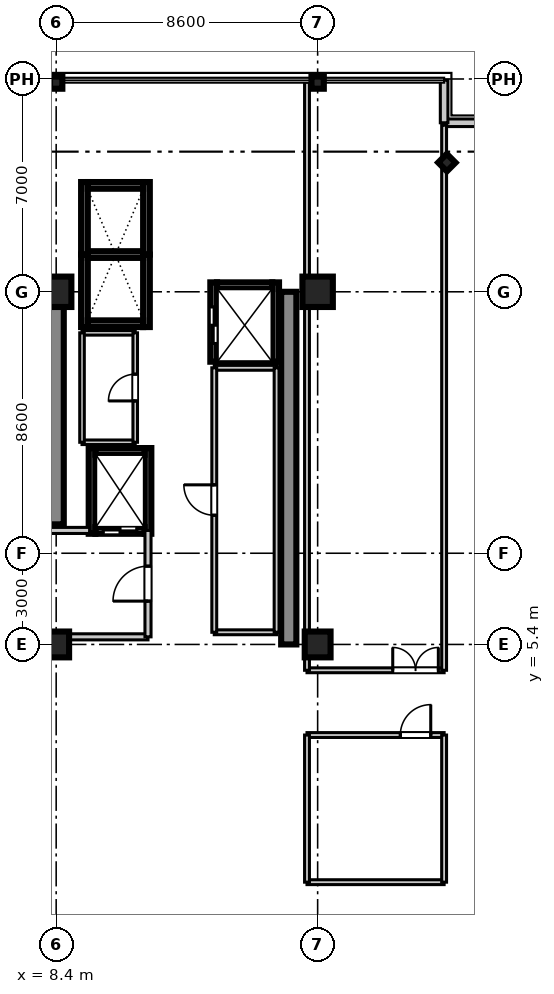
"""IFC4 building model, lengths in metres.
Left out: names, types, materials, properties, quantities, classifications, styles, units other than length and angle.
Written with IfcOpenShell. Run it as: python <this file> out.ifc"""

import sys

from ifc_helpers import new_model, si_unit, direction, frame, frame_2d, origin, origin_2d, place, context, subcontext, project, spatial, rectangle, i_section, extrude, source, transform, mapped, element, fill, save


model = new_model("IFC4")
c1 = context("Model", 3, precision=1e-05, world=origin(), true_north=direction((0.0, 1.0)))
c2 = subcontext(c1, "Body", "Model", "MODEL_VIEW")
j1 = project(units=[si_unit("LENGTHUNIT", "METRE"), si_unit("PLANEANGLEUNIT", "RADIAN")], contexts=[c1])
p1 = place(None, origin())
s1 = spatial("IfcSite", under=j1, at=p1, CompositionType="ELEMENT")
p2 = place(p1, origin())
s2 = spatial("IfcBuilding", under=s1, at=p2, CompositionType="ELEMENT")
p3 = place(p2, frame((0.0, 0.0, 249.3)))
s3 = spatial("IfcBuildingStorey", under=s2, at=p3, CompositionType="ELEMENT", Elevation=249.3)
m1 = source(origin(), c2, "Body", "SweptSolid", [
    extrude(rectangle(XDim=0.85, YDim=0.85, at=origin_2d()), origin(), (0.0, 0.0, 1.0), 3.655),
])
p4 = place(p3, frame((8.4, 5.4, 0.0), z_axis=(0.0, 0.0, 1.0), x_axis=(1.0, 0.0, 0.0)))
e1 = element("IfcColumn", 1, at=p4, inside=s3, PredefinedType="PILASTER", context=c2, shape_type="MappedRepresentation", body=[
    mapped(m1, transform((0.0, 0.0, 0.0), scale=1.0)),
])
m2 = source(origin(), c2, "Body", "SweptSolid", [
    extrude(rectangle(XDim=1.0, YDim=1.0, at=origin_2d()), origin(), (0.0, 0.0, 1.0), 3.655),
])
p5 = place(p3, frame((8.4, 17.0, 0.0), z_axis=(0.0, 0.0, 1.0), x_axis=(1.0, 0.0, 0.0)))
e2 = element("IfcColumn", 2, at=p5, inside=s3, PredefinedType="COLUMN", context=c2, shape_type="MappedRepresentation", body=[
    mapped(m2, transform((0.0, 0.0, 0.0), scale=1.0)),
])
p6 = place(p3, frame((17.0, 5.4, 0.0), z_axis=(0.0, 0.0, 1.0), x_axis=(1.0, 0.0, 0.0)))
e3 = element("IfcColumn", 3, at=p6, inside=s3, PredefinedType="PILASTER", context=c2, shape_type="MappedRepresentation", body=[
    mapped(m1, transform((0.0, 0.0, 0.0), scale=1.0)),
])
p7 = place(p3, frame((17.0, 17.0, 0.0), z_axis=(0.0, 0.0, 1.0), x_axis=(1.0, 0.0, 0.0)))
e4 = element("IfcColumn", 4, at=p7, inside=s3, PredefinedType="COLUMN", context=c2, shape_type="MappedRepresentation", body=[
    mapped(m2, transform((0.0, 0.0, 0.0), scale=1.0)),
])
m3 = source(origin(), c2, "Body", "SweptSolid", [
    extrude(i_section(OverallWidth=0.401, OverallDepth=0.406, WebThickness=0.016, FlangeThickness=0.025, at=origin_2d()), origin(), (0.0, 0.0, 1.0), 3.655),
])
for number, where, z_axis, x_axis in (
    (5, (8.4, 23.88, 0.0), (0.0, 0.0, 1.0), (0.0, 1.0, 0.0)),
    (6, (17.0, 23.88, 0.0), (0.0, 0.0, 1.0), (0.0, 1.0, 0.0)),
    (7, (21.25, 21.25, 0.0), (0.0, 0.0, 1.0), (0.707, 0.707, 0.0)),
):
    element("IfcColumn", number, at=place(p3, frame(where, z_axis=z_axis, x_axis=x_axis)), inside=s3, PredefinedType="COLUMN", context=c2, shape_type="MappedRepresentation", body=[
        mapped(m3, transform((0.0, 0.0, 0.0), scale=1.0)),
    ])
m4 = source(origin(), c2, "Body", "SweptSolid", [
    extrude(rectangle(XDim=7.65, YDim=0.5, at=frame_2d((3.825, 0.0))), origin(), (0.0, 0.0, 1.0), 3.41),
])
p8 = place(p3, frame((8.4, 9.35, 0.0), z_axis=(0.0, 0.0, 1.0), x_axis=(0.0, 1.0, 0.0)))
e8 = element("IfcWall", 8, at=p8, inside=s3, PredefinedType="SHEAR", context=c2, shape_type="MappedRepresentation", body=[
    mapped(m4, transform((0.0, 0.0, 0.0), scale=1.0)),
])
m5 = source(origin(), c2, "Body", "SweptSolid", [
    extrude(rectangle(XDim=11.6, YDim=0.5, at=frame_2d((5.8, 0.0))), origin(), (0.0, 0.0, 1.0), 3.41),
])
p9 = place(p3, frame((16.05, 5.4, 0.0), z_axis=(0.0, 0.0, 1.0), x_axis=(0.0, 1.0, 0.0)))
e9 = element("IfcWall", 9, at=p9, inside=s3, PredefinedType="SHEAR", context=c2, shape_type="MappedRepresentation", body=[
    mapped(m5, transform((0.0, 0.0, 0.0), scale=1.0)),
])
m6 = source(origin(), c2, "Body", "SweptSolid", [
    extrude(rectangle(XDim=2.385, YDim=0.22, at=frame_2d((1.192, 0.0))), origin(), (0.0, 0.0, 1.0), 3.41),
])
for number, where, z_axis, x_axis in (
    (10, (9.33, 15.84, 0.0), (0.0, 0.0, 1.0), (0.0, 1.0, 0.0)),
    (11, (11.37, 15.84, 0.0), (0.0, 0.0, 1.0), (0.0, 1.0, 0.0)),
):
    element("IfcWall", number, at=place(p3, frame(where, z_axis=z_axis, x_axis=x_axis)), inside=s3, PredefinedType="SHEAR", context=c2, shape_type="MappedRepresentation", body=[
        mapped(m6, transform((0.0, 0.0, 0.0), scale=1.0)),
    ])
m7 = source(origin(), c2, "Body", "SweptSolid", [
    extrude(rectangle(XDim=1.82, YDim=0.22, at=frame_2d((0.91, 0.0))), origin(), (0.0, 0.0, 1.0), 3.41),
])
p10 = place(p3, frame((9.44, 15.95, 0.0), z_axis=(0.0, 0.0, 1.0), x_axis=(1.0, 0.0, 0.0)))
e12 = element("IfcWall", 12, at=p10, inside=s3, PredefinedType="SHEAR", context=c2, shape_type="MappedRepresentation", body=[
    mapped(m7, transform((0.0, 0.0, 0.0), scale=1.0)),
])
m8 = source(origin(), c2, "Body", "SweptSolid", [
    extrude(rectangle(XDim=1.82, YDim=0.22, at=frame_2d((0.91, 0.0))), origin(), (0.0, 0.0, 1.0), 3.7),
])
p11 = place(p3, frame((9.44, 18.225, 0.0), z_axis=(0.0, 0.0, 1.0), x_axis=(1.0, 0.0, 0.0)))
e13 = element("IfcWall", 13, at=p11, inside=s3, PredefinedType="SHEAR", context=c2, shape_type="MappedRepresentation", body=[
    mapped(m8, transform((0.0, 0.0, 0.0), scale=1.0)),
])
for number, where, z_axis, x_axis in (
    (14, (9.33, 18.225, 0.0), (0.0, 0.0, 1.0), (0.0, 1.0, 0.0)),
    (15, (11.37, 18.225, 0.0), (0.0, 0.0, 1.0), (0.0, 1.0, 0.0)),
):
    element("IfcWall", number, at=place(p3, frame(where, z_axis=z_axis, x_axis=x_axis)), inside=s3, PredefinedType="SHEAR", context=c2, shape_type="MappedRepresentation", body=[
        mapped(m6, transform((0.0, 0.0, 0.0), scale=1.0)),
    ])
p12 = place(p3, frame((9.44, 20.5, 0.0), z_axis=(0.0, 0.0, 1.0), x_axis=(1.0, 0.0, 0.0)))
e16 = element("IfcWall", 16, at=p12, inside=s3, PredefinedType="SHEAR", context=c2, shape_type="MappedRepresentation", body=[
    mapped(m7, transform((0.0, 0.0, 0.0), scale=1.0)),
])
m9 = source(origin(), c2, "Body", "SweptSolid", [
    extrude(rectangle(XDim=2.82, YDim=0.22, at=frame_2d((1.41, 0.0))), origin(), (0.0, 0.0, 1.0), 3.41),
])
for number, where, z_axis, x_axis in (
    (17, (9.58, 9.04, 0.0), (0.0, 0.0, 1.0), (0.0, 1.0, 0.0)),
    (18, (11.42, 9.04, 0.0), (0.0, 0.0, 1.0), (0.0, 1.0, 0.0)),
):
    element("IfcWall", number, at=place(p3, frame(where, z_axis=z_axis, x_axis=x_axis)), inside=s3, PredefinedType="SHEAR", context=c2, shape_type="MappedRepresentation", body=[
        mapped(m9, transform((0.0, 0.0, 0.0), scale=1.0)),
    ])
m10 = source(origin(), c2, "Body", "SweptSolid", [
    extrude(rectangle(XDim=1.62, YDim=0.22, at=frame_2d((0.81, 0.0))), origin(), (0.0, 0.0, 1.0), 3.41),
])
p13 = place(p3, frame((9.69, 9.15, 0.0), z_axis=(0.0, 0.0, 1.0), x_axis=(1.0, 0.0, 0.0)))
e19 = element("IfcWall", 19, at=p13, inside=s3, PredefinedType="SHEAR", context=c2, shape_type="MappedRepresentation", body=[
    mapped(m10, transform((0.0, 0.0, 0.0), scale=1.0)),
])
p14 = place(p13, frame((0.26, 0.0, 0.0)))
e20 = element("IfcOpeningElement", 20, at=p14, cuts=e19, PredefinedType="OPENING", context=c2, shape_type="SweptSolid", body=[
    extrude(rectangle(XDim=1.1, YDim=2.2, at=frame_2d((0.55, 1.1))), frame((0.0, 0.12, 0.0), z_axis=(0.0, -1.0, 0.0), x_axis=(1.0, 0.0, 0.0)), (0.0, 0.0, 1.0), 0.24),
])
p15 = place(p3, frame((9.69, 11.75, 0.0), z_axis=(0.0, 0.0, 1.0), x_axis=(1.0, 0.0, 0.0)))
e21 = element("IfcWall", 21, at=p15, inside=s3, PredefinedType="SHEAR", context=c2, shape_type="MappedRepresentation", body=[
    mapped(m10, transform((0.0, 0.0, 0.0), scale=1.0)),
])
m11 = source(origin(), c2, "Body", "SweptSolid", [
    extrude(rectangle(XDim=2.61, YDim=0.22, at=frame_2d((1.305, 0.0))), origin(), (0.0, 0.0, 1.0), 3.41),
])
p16 = place(p3, frame((13.58, 14.7, 0.0), z_axis=(0.0, 0.0, 1.0), x_axis=(0.0, 1.0, 0.0)))
e22 = element("IfcWall", 22, at=p16, inside=s3, PredefinedType="SHEAR", context=c2, shape_type="MappedRepresentation", body=[
    mapped(m11, transform((0.0, 0.0, 0.0), scale=1.0)),
])
p17 = place(p16, frame((0.6, 0.0, 0.0)))
e23 = element("IfcOpeningElement", 23, at=p17, cuts=e22, PredefinedType="OPENING", context=c2, shape_type="SweptSolid", body=[
    extrude(rectangle(XDim=1.2, YDim=2.2, at=frame_2d((0.6, 1.1))), frame((0.0, 0.12, 0.0), z_axis=(0.0, -1.0, 0.0), x_axis=(1.0, 0.0, 0.0)), (0.0, 0.0, 1.0), 0.24),
])
p18 = place(p3, frame((15.62, 14.7, 0.0), z_axis=(0.0, 0.0, 1.0), x_axis=(0.0, 1.0, 0.0)))
e24 = element("IfcWall", 24, at=p18, inside=s3, PredefinedType="SHEAR", context=c2, shape_type="MappedRepresentation", body=[
    mapped(m11, transform((0.0, 0.0, 0.0), scale=1.0)),
])
p19 = place(p3, frame((13.69, 17.2, 0.0), z_axis=(0.0, 0.0, 1.0), x_axis=(1.0, 0.0, 0.0)))
e25 = element("IfcWall", 25, at=p19, inside=s3, PredefinedType="SHEAR", context=c2, shape_type="MappedRepresentation", body=[
    mapped(m7, transform((0.0, 0.0, 0.0), scale=1.0)),
])
m12 = source(origin(), c2, "Body", "SweptSolid", [
    extrude(rectangle(XDim=1.4, YDim=0.25, at=frame_2d((0.7, 0.0))), origin(), (0.0, 0.0, 1.0), 3.41),
])
p20 = place(p3, frame((21.16, 22.56, 0.0), z_axis=(0.0, 0.0, 1.0), x_axis=(1.0, 0.0, 0.0)))
e26 = element("IfcWall", 26, at=p20, inside=s3, PredefinedType="STANDARD", context=c2, shape_type="MappedRepresentation", body=[
    mapped(m12, transform((0.0, 0.0, 0.0), scale=1.0)),
])
m13 = source(origin(), c2, "Body", "SweptSolid", [
    extrude(rectangle(XDim=1.4, YDim=0.25, at=frame_2d((0.7, 0.0))), origin(), (0.0, 0.0, 1.0), 3.41),
])
p21 = place(p3, frame((21.16, 22.56, 0.0), z_axis=(0.0, 0.0, 1.0), x_axis=(0.0, 1.0, 0.0)))
e27 = element("IfcWall", 27, at=p21, inside=s3, PredefinedType="STANDARD", context=c2, shape_type="MappedRepresentation", body=[
    mapped(m13, transform((0.0, 0.0, 0.0), scale=1.0)),
])
m14 = source(origin(), c2, "Body", "SweptSolid", [
    extrude(rectangle(XDim=3.82, YDim=0.2, at=frame_2d((1.91, 0.0))), origin(), (0.0, 0.0, 1.0), 2.75),
])
p22 = place(p3, frame((7.6, 5.65, 0.0), z_axis=(0.0, 0.0, 1.0), x_axis=(1.0, 0.0, 0.0)))
e28 = element("IfcWall", 28, at=p22, inside=s3, PredefinedType="PARTITIONING", context=c2, shape_type="MappedRepresentation", body=[
    mapped(m14, transform((0.0, 0.0, 0.0), scale=1.0)),
])
m15 = source(origin(), c2, "Body", "SweptSolid", [
    extrude(rectangle(XDim=1.9, YDim=0.2, at=frame_2d((0.95, 0.0))), origin(), (0.0, 0.0, 1.0), 2.75),
])
p23 = place(p3, frame((7.6, 9.15, 0.0), z_axis=(0.0, 0.0, 1.0), x_axis=(1.0, 0.0, 0.0)))
e29 = element("IfcWall", 29, at=p23, inside=s3, PredefinedType="PARTITIONING", context=c2, shape_type="MappedRepresentation", body=[
    mapped(m15, transform((0.0, 0.0, 0.0), scale=1.0)),
])
m16 = source(origin(), c2, "Body", "SweptSolid", [
    extrude(rectangle(XDim=3.5, YDim=0.2, at=frame_2d((1.75, 0.0))), origin(), (0.0, 0.0, 1.0), 2.75),
])
p24 = place(p3, frame((11.42, 5.65, 0.0), z_axis=(0.0, 0.0, 1.0), x_axis=(0.0, 1.0, 0.0)))
e30 = element("IfcWall", 30, at=p24, inside=s3, PredefinedType="PARTITIONING", context=c2, shape_type="MappedRepresentation", body=[
    mapped(m16, transform((0.0, 0.0, 0.0), scale=1.0)),
])
p25 = place(p24, frame((1.175, 0.0, 0.0)))
e31 = element("IfcOpeningElement", 31, at=p25, cuts=e30, PredefinedType="OPENING", context=c2, shape_type="SweptSolid", body=[
    extrude(rectangle(XDim=1.15, YDim=2.15, at=frame_2d((0.575, 1.075))), frame((0.0, 0.11, 0.0), z_axis=(0.0, -1.0, 0.0), x_axis=(1.0, 0.0, 0.0)), (0.0, 0.0, 1.0), 0.22),
])
m17 = source(origin(), c2, "Body", "SweptSolid", [
    extrude(rectangle(XDim=1.75, YDim=0.15, at=frame_2d((0.875, 0.0))), origin(), (0.0, 0.0, 1.0), 2.75),
])
for number, where, z_axis, x_axis in (
    (32, (9.25, 12.05, 0.0), (0.0, 0.0, 1.0), (1.0, 0.0, 0.0)),
    (33, (9.25, 15.65, 0.0), (0.0, 0.0, 1.0), (1.0, 0.0, 0.0)),
):
    element("IfcWall", number, at=place(p3, frame(where, z_axis=z_axis, x_axis=x_axis)), inside=s3, PredefinedType="PARTITIONING", context=c2, shape_type="MappedRepresentation", body=[
        mapped(m17, transform((0.0, 0.0, 0.0), scale=1.0)),
    ])
m18 = source(origin(), c2, "Body", "SweptSolid", [
    extrude(rectangle(XDim=3.6, YDim=0.15, at=frame_2d((1.8, 0.0))), origin(), (0.0, 0.0, 1.0), 2.75),
])
p26 = place(p3, frame((9.25, 12.05, 0.0), z_axis=(0.0, 0.0, 1.0), x_axis=(0.0, 1.0, 0.0)))
e34 = element("IfcWall", 34, at=p26, inside=s3, PredefinedType="PARTITIONING", context=c2, shape_type="MappedRepresentation", body=[
    mapped(m18, transform((0.0, 0.0, 0.0), scale=1.0)),
])
p27 = place(p3, frame((11.0, 12.05, 0.0), z_axis=(0.0, 0.0, 1.0), x_axis=(0.0, 1.0, 0.0)))
e35 = element("IfcWall", 35, at=p27, inside=s3, PredefinedType="PARTITIONING", context=c2, shape_type="MappedRepresentation", body=[
    mapped(m18, transform((0.0, 0.0, 0.0), scale=1.0)),
])
p28 = place(p27, frame((1.36, 0.0, 0.0)))
e36 = element("IfcOpeningElement", 36, at=p28, cuts=e35, PredefinedType="OPENING", context=c2, shape_type="SweptSolid", body=[
    extrude(rectangle(XDim=0.88, YDim=2.1, at=frame_2d((0.44, 1.05))), frame((0.0, 0.085, 0.0), z_axis=(0.0, -1.0, 0.0), x_axis=(1.0, 0.0, 0.0)), (0.0, 0.0, 1.0), 0.17),
])
m19 = source(origin(), c2, "Body", "SweptSolid", [
    extrude(rectangle(XDim=2.05, YDim=0.16, at=frame_2d((1.025, 0.0))), origin(), (0.0, 0.0, 1.0), 2.75),
])
for number, where, z_axis, x_axis in (
    (37, (13.6, 5.8, 0.0), (0.0, 0.0, 1.0), (1.0, 0.0, 0.0)),
    (38, (13.6, 14.5, 0.0), (0.0, 0.0, 1.0), (1.0, 0.0, 0.0)),
):
    element("IfcWall", number, at=place(p3, frame(where, z_axis=z_axis, x_axis=x_axis)), inside=s3, PredefinedType="PARTITIONING", context=c2, shape_type="MappedRepresentation", body=[
        mapped(m19, transform((0.0, 0.0, 0.0), scale=1.0)),
    ])
m20 = source(origin(), c2, "Body", "SweptSolid", [
    extrude(rectangle(XDim=8.7, YDim=0.16, at=frame_2d((4.35, 0.0))), origin(), (0.0, 0.0, 1.0), 2.75),
])
p29 = place(p3, frame((13.6, 5.8, 0.0), z_axis=(0.0, 0.0, 1.0), x_axis=(0.0, 1.0, 0.0)))
e39 = element("IfcWall", 39, at=p29, inside=s3, PredefinedType="PARTITIONING", context=c2, shape_type="MappedRepresentation", body=[
    mapped(m20, transform((0.0, 0.0, 0.0), scale=1.0)),
])
p30 = place(p29, frame((3.85, 0.0, 0.0)))
e40 = element("IfcOpeningElement", 40, at=p30, cuts=e39, PredefinedType="OPENING", context=c2, shape_type="SweptSolid", body=[
    extrude(rectangle(XDim=1.0, YDim=2.1, at=frame_2d((0.5, 1.05))), frame((0.0, 0.09, 0.0), z_axis=(0.0, -1.0, 0.0), x_axis=(1.0, 0.0, 0.0)), (0.0, 0.0, 1.0), 0.18),
])
p31 = place(p3, frame((15.65, 5.8, 0.0), z_axis=(0.0, 0.0, 1.0), x_axis=(0.0, 1.0, 0.0)))
e41 = element("IfcWall", 41, at=p31, inside=s3, PredefinedType="PARTITIONING", context=c2, shape_type="MappedRepresentation", body=[
    mapped(m20, transform((0.0, 0.0, 0.0), scale=1.0)),
])
m21 = source(origin(), c2, "Body", "SweptSolid", [
    extrude(rectangle(XDim=4.51, YDim=0.16, at=frame_2d((2.255, 0.0))), origin(), (0.0, 0.0, 1.0), 2.75),
])
p32 = place(p3, frame((16.65, 4.55, 0.0), z_axis=(0.0, 0.0, 1.0), x_axis=(1.0, 0.0, 0.0)))
e42 = element("IfcWall", 42, at=p32, inside=s3, PredefinedType="PARTITIONING", context=c2, shape_type="MappedRepresentation", body=[
    mapped(m21, transform((0.0, 0.0, 0.0), scale=1.0)),
])
p33 = place(p32, frame((2.82, 0.0, 0.0)))
e43 = element("IfcOpeningElement", 43, at=p33, cuts=e42, PredefinedType="OPENING", context=c2, shape_type="SweptSolid", body=[
    extrude(rectangle(XDim=1.5, YDim=2.15, at=frame_2d((0.75, 1.075))), frame((0.0, 0.09, 0.0), z_axis=(0.0, -1.0, 0.0), x_axis=(1.0, 0.0, 0.0)), (0.0, 0.0, 1.0), 0.18),
])
m22 = source(origin(), c2, "Body", "SweptSolid", [
    extrude(rectangle(XDim=19.35, YDim=0.16, at=frame_2d((9.675, 0.0))), origin(), (0.0, 0.0, 1.0), 2.75),
])
p34 = place(p3, frame((16.65, 4.55, 0.0), z_axis=(0.0, 0.0, 1.0), x_axis=(0.0, 1.0, 0.0)))
e44 = element("IfcWall", 44, at=p34, inside=s3, PredefinedType="PARTITIONING", context=c2, shape_type="MappedRepresentation", body=[
    mapped(m22, transform((0.0, 0.0, 0.0), scale=1.0)),
])
m23 = source(origin(), c2, "Body", "SweptSolid", [
    extrude(rectangle(XDim=17.93, YDim=0.16, at=frame_2d((8.965, 0.0))), origin(), (0.0, 0.0, 1.0), 2.75),
])
p35 = place(p3, frame((21.16, 4.55, 0.0), z_axis=(0.0, 0.0, 1.0), x_axis=(0.0, 1.0, 0.0)))
e45 = element("IfcWall", 45, at=p35, inside=s3, PredefinedType="PARTITIONING", context=c2, shape_type="MappedRepresentation", body=[
    mapped(m23, transform((0.0, 0.0, 0.0), scale=1.0)),
])
p36 = place(p3, frame((16.65, -2.42, 0.0), z_axis=(0.0, 0.0, 1.0), x_axis=(1.0, 0.0, 0.0)))
e46 = element("IfcWall", 46, at=p36, inside=s3, PredefinedType="PARTITIONING", context=c2, shape_type="MappedRepresentation", body=[
    mapped(m21, transform((0.0, 0.0, 0.0), scale=1.0)),
])
p37 = place(p3, frame((16.65, 2.42, 0.0), z_axis=(0.0, 0.0, 1.0), x_axis=(1.0, 0.0, 0.0)))
e47 = element("IfcWall", 47, at=p37, inside=s3, PredefinedType="PARTITIONING", context=c2, shape_type="MappedRepresentation", body=[
    mapped(m21, transform((0.0, 0.0, 0.0), scale=1.0)),
])
p38 = place(p37, frame((3.07, 0.0, 0.0)))
e48 = element("IfcOpeningElement", 48, at=p38, cuts=e47, PredefinedType="OPENING", context=c2, shape_type="SweptSolid", body=[
    extrude(rectangle(XDim=1.0, YDim=2.1, at=frame_2d((0.5, 1.05))), frame((0.0, 0.09, 0.0), z_axis=(0.0, -1.0, 0.0), x_axis=(1.0, 0.0, 0.0)), (0.0, 0.0, 1.0), 0.18),
])
m24 = source(origin(), c2, "Body", "SweptSolid", [
    extrude(rectangle(XDim=4.84, YDim=0.16, at=frame_2d((2.42, 0.0))), origin(), (0.0, 0.0, 1.0), 2.75),
])
for number, where, z_axis, x_axis in (
    (49, (16.65, -2.42, 0.0), (0.0, 0.0, 1.0), (0.0, 1.0, 0.0)),
    (50, (21.16, -2.42, 0.0), (0.0, 0.0, 1.0), (0.0, 1.0, 0.0)),
):
    element("IfcWall", number, at=place(p3, frame(where, z_axis=z_axis, x_axis=x_axis)), inside=s3, PredefinedType="PARTITIONING", context=c2, shape_type="MappedRepresentation", body=[
        mapped(m24, transform((0.0, 0.0, 0.0), scale=1.0)),
    ])
m25 = source(origin(), c2, "Body", "SweptSolid", [
    extrude(rectangle(XDim=1.1, YDim=2.2, at=frame_2d((0.55, 1.1))), frame((0.0, 0.025, 0.0), z_axis=(0.0, -1.0, 0.0), x_axis=(1.0, 0.0, 0.0)), (0.0, 0.0, 1.0), 0.05),
])
p39 = place(p14, frame((1.1, 0.0, 0.0), z_axis=(0.0, 0.0, 1.0), x_axis=(-1.0, 0.0, 0.0)))
e51 = element("IfcDoor", 51, at=p39, inside=s3, OperationType="DOUBLE_DOOR_SLIDING", PredefinedType="DOOR", context=c2, shape_type="MappedRepresentation", body=[
    mapped(m25, transform((0.0, 0.0, 0.0), scale=1.0)),
])
fill(e20, e51)
m26 = source(origin(), c2, "Body", "SweptSolid", [
    extrude(rectangle(XDim=1.2, YDim=2.2, at=frame_2d((0.6, 1.1))), frame((0.0, 0.025, 0.0), z_axis=(0.0, -1.0, 0.0), x_axis=(1.0, 0.0, 0.0)), (0.0, 0.0, 1.0), 0.05),
])
p40 = place(p17, origin())
e52 = element("IfcDoor", 52, at=p40, inside=s3, OperationType="DOUBLE_DOOR_SLIDING", PredefinedType="DOOR", context=c2, shape_type="MappedRepresentation", body=[
    mapped(m26, transform((0.0, 0.0, 0.0), scale=1.0)),
])
fill(e23, e52)
m27 = source(origin(), c2, "Body", "SweptSolid", [
    extrude(rectangle(XDim=1.15, YDim=2.15, at=frame_2d((0.575, 1.075))), frame((0.0, 0.025, 0.0), z_axis=(0.0, -1.0, 0.0), x_axis=(1.0, 0.0, 0.0)), (0.0, 0.0, 1.0), 0.05),
])
p41 = place(p25, frame((1.15, 0.0, 0.0), z_axis=(0.0, 0.0, 1.0), x_axis=(-1.0, 0.0, 0.0)))
e53 = element("IfcDoor", 53, at=p41, inside=s3, OperationType="SINGLE_SWING_LEFT", PredefinedType="DOOR", context=c2, shape_type="MappedRepresentation", body=[
    mapped(m27, transform((0.0, 0.0, 0.0), scale=1.0)),
])
fill(e31, e53)
m28 = source(origin(), c2, "Body", "SweptSolid", [
    extrude(rectangle(XDim=0.88, YDim=2.1, at=frame_2d((0.44, 1.05))), frame((0.0, 0.025, 0.0), z_axis=(0.0, -1.0, 0.0), x_axis=(1.0, 0.0, 0.0)), (0.0, 0.0, 1.0), 0.05),
])
p42 = place(p28, origin())
e54 = element("IfcDoor", 54, at=p42, inside=s3, OperationType="SINGLE_SWING_LEFT", PredefinedType="DOOR", context=c2, shape_type="MappedRepresentation", body=[
    mapped(m28, transform((0.0, 0.0, 0.0), scale=1.0)),
])
fill(e36, e54)
m29 = source(origin(), c2, "Body", "SweptSolid", [
    extrude(rectangle(XDim=1.0, YDim=2.1, at=frame_2d((0.5, 1.05))), frame((0.0, 0.025, 0.0), z_axis=(0.0, -1.0, 0.0), x_axis=(1.0, 0.0, 0.0)), (0.0, 0.0, 1.0), 0.05),
])
p43 = place(p30, frame((1.0, 0.0, 0.0), z_axis=(0.0, 0.0, 1.0), x_axis=(-1.0, 0.0, 0.0)))
e55 = element("IfcDoor", 55, at=p43, inside=s3, OperationType="SINGLE_SWING_RIGHT", PredefinedType="DOOR", context=c2, shape_type="MappedRepresentation", body=[
    mapped(m29, transform((0.0, 0.0, 0.0), scale=1.0)),
])
fill(e40, e55)
m30 = source(origin(), c2, "Body", "SweptSolid", [
    extrude(rectangle(XDim=1.5, YDim=2.15, at=frame_2d((0.75, 1.075))), frame((0.0, 0.025, 0.0), z_axis=(0.0, -1.0, 0.0), x_axis=(1.0, 0.0, 0.0)), (0.0, 0.0, 1.0), 0.05),
])
p44 = place(p33, origin())
e56 = element("IfcDoor", 56, at=p44, inside=s3, OperationType="DOUBLE_DOOR_SINGLE_SWING", PredefinedType="DOOR", context=c2, shape_type="MappedRepresentation", body=[
    mapped(m30, transform((0.0, 0.0, 0.0), scale=1.0)),
])
fill(e43, e56)
p45 = place(p38, frame((1.0, 0.0, 0.0), z_axis=(0.0, 0.0, 1.0), x_axis=(-1.0, 0.0, 0.0)))
e57 = element("IfcDoor", 57, at=p45, inside=s3, OperationType="SINGLE_SWING_RIGHT", PredefinedType="DOOR", context=c2, shape_type="MappedRepresentation", body=[
    mapped(m29, transform((0.0, 0.0, 0.0), scale=1.0)),
])
fill(e48, e57)
save(model, sys.argv[1])
